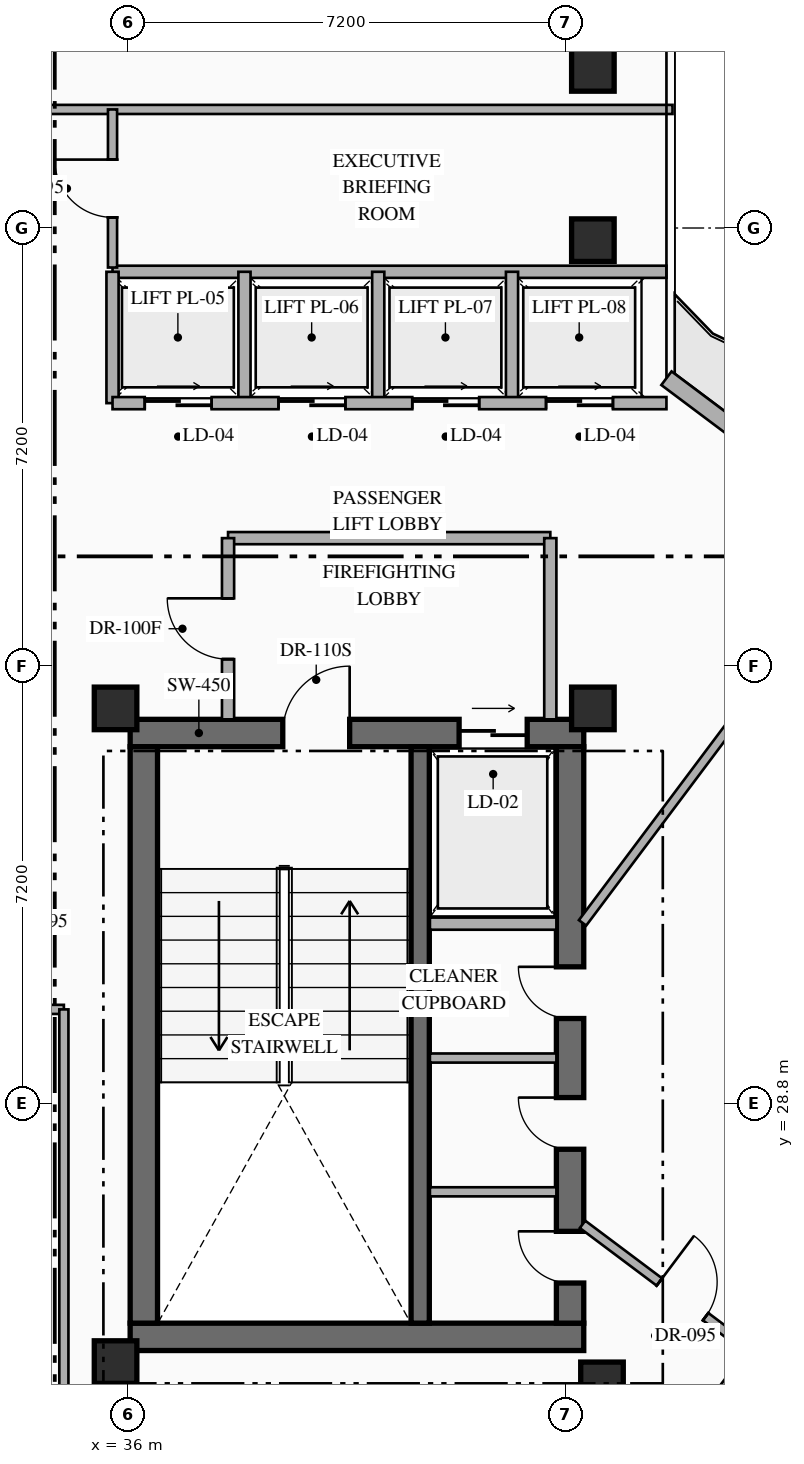
"""IFC4 building model, lengths in metres.
Left out: names, types, materials, properties, quantities, classifications, styles, units other than length and angle.
Written with IfcOpenShell. Run it as: python <this file> out.ifc"""

import sys

from ifc_helpers import new_model, si_unit, direction, frame, frame_2d, origin, origin_2d, place, context, subcontext, project, spatial, rectangle, hollow_rectangle, extrude, element, fill, save


model = new_model("IFC4")
c1 = context("Model", 3, precision=1e-05, world=origin(), true_north=direction((0.0, 1.0)))
c2 = subcontext(c1, "Body", "Model", "MODEL_VIEW")
j1 = project(units=[si_unit("LENGTHUNIT", "METRE"), si_unit("PLANEANGLEUNIT", "RADIAN")], contexts=[c1])
p1 = place(None, origin())
s1 = spatial("IfcSite", under=j1, at=p1, CompositionType="ELEMENT")
p2 = place(p1, origin())
s2 = spatial("IfcBuilding", under=s1, at=p2, CompositionType="ELEMENT")
p3 = place(p2, frame((0.0, 0.0, 227.55)))
s3 = spatial("IfcBuildingStorey", under=s2, at=p3, CompositionType="ELEMENT", Elevation=227.55)
p4 = place(p3, frame((36.04, 24.965, 0.0), z_axis=(0.0, 0.0, 1.0), x_axis=(1.0, 0.0, 0.0)))
e1 = element("IfcWall", 1, at=p4, inside=s3, PredefinedType="SHEAR", context=c2, shape_type="SweptSolid", body=[
    extrude(rectangle(XDim=7.46, YDim=0.45, at=frame_2d((3.73, 0.0))), origin(), (0.0, 0.0, 1.0), 3.6),
])
p5 = place(p3, frame((36.04, 34.895, 0.0), z_axis=(0.0, 0.0, 1.0), x_axis=(1.0, 0.0, 0.0)))
e2 = element("IfcWall", 2, at=p5, inside=s3, PredefinedType="SHEAR", context=c2, shape_type="SweptSolid", body=[
    extrude(rectangle(XDim=7.46, YDim=0.45, at=frame_2d((3.73, 0.0))), origin(), (0.0, 0.0, 1.0), 3.6),
])
p6 = place(p5, frame((2.51, 0.0, 0.0)))
e3 = element("IfcOpeningElement", 3, at=p6, cuts=e2, PredefinedType="OPENING", context=c2, shape_type="SweptSolid", body=[
    extrude(rectangle(XDim=1.1, YDim=2.2, at=frame_2d((0.55, 1.1))), frame((0.0, 0.235, 0.0), z_axis=(0.0, -1.0, 0.0), x_axis=(1.0, 0.0, 0.0)), (0.0, 0.0, 1.0), 0.47),
])
p7 = place(p5, frame((5.41, 0.0, 0.0)))
e4 = element("IfcOpeningElement", 4, at=p7, cuts=e2, PredefinedType="OPENING", context=c2, shape_type="SweptSolid", body=[
    extrude(rectangle(XDim=1.12, YDim=2.15, at=frame_2d((0.56, 1.075))), frame((0.0, 0.235, 0.0), z_axis=(0.0, -1.0, 0.0), x_axis=(1.0, 0.0, 0.0)), (0.0, 0.0, 1.0), 0.47),
])
p8 = place(p3, frame((36.265, 25.19, 0.0), z_axis=(0.0, 0.0, 1.0), x_axis=(0.0, 1.0, 0.0)))
e5 = element("IfcWall", 5, at=p8, inside=s3, PredefinedType="SHEAR", context=c2, shape_type="SweptSolid", body=[
    extrude(rectangle(XDim=9.48, YDim=0.45, at=frame_2d((4.74, 0.0))), origin(), (0.0, 0.0, 1.0), 3.6),
])
p9 = place(p3, frame((43.275, 25.19, 0.0), z_axis=(0.0, 0.0, 1.0), x_axis=(0.0, 1.0, 0.0)))
e6 = element("IfcWall", 6, at=p9, inside=s3, PredefinedType="SHEAR", context=c2, shape_type="SweptSolid", body=[
    extrude(rectangle(XDim=9.48, YDim=0.45, at=frame_2d((4.74, 0.0))), origin(), (0.0, 0.0, 1.0), 3.6),
])
p10 = place(p9, frame((0.66, 0.0, 0.0)))
e7 = element("IfcOpeningElement", 7, at=p10, cuts=e6, PredefinedType="OPENING", context=c2, shape_type="SweptSolid", body=[
    extrude(rectangle(XDim=0.85, YDim=2.08, at=frame_2d((0.425, 1.04))), frame((0.0, 0.235, 0.0), z_axis=(0.0, -1.0, 0.0), x_axis=(1.0, 0.0, 0.0)), (0.0, 0.0, 1.0), 0.47),
])
p11 = place(p9, frame((2.86, 0.0, 0.0)))
e8 = element("IfcOpeningElement", 8, at=p11, cuts=e6, PredefinedType="OPENING", context=c2, shape_type="SweptSolid", body=[
    extrude(rectangle(XDim=0.85, YDim=2.08, at=frame_2d((0.425, 1.04))), frame((0.0, 0.235, 0.0), z_axis=(0.0, -1.0, 0.0), x_axis=(1.0, 0.0, 0.0)), (0.0, 0.0, 1.0), 0.47),
])
p12 = place(p9, frame((5.01, 0.0, 0.0)))
e9 = element("IfcOpeningElement", 9, at=p12, cuts=e6, PredefinedType="OPENING", context=c2, shape_type="SweptSolid", body=[
    extrude(rectangle(XDim=0.85, YDim=2.08, at=frame_2d((0.425, 1.04))), frame((0.0, 0.235, 0.0), z_axis=(0.0, -1.0, 0.0), x_axis=(1.0, 0.0, 0.0)), (0.0, 0.0, 1.0), 0.47),
])
p13 = place(p3, frame((40.81, 25.19, 0.0), z_axis=(0.0, 0.0, 1.0), x_axis=(0.0, 1.0, 0.0)))
e10 = element("IfcWall", 10, at=p13, inside=s3, PredefinedType="SHEAR", context=c2, shape_type="SweptSolid", body=[
    extrude(rectangle(XDim=9.48, YDim=0.3, at=frame_2d((4.74, 0.0))), origin(), (0.0, 0.0, 1.0), 3.6),
])
for number, where, z_axis, x_axis in (
    (11, (35.8, 24.55, 0.0), (0.0, 0.0, 1.0), (1.0, 0.0, 0.0)),
    (12, (43.8, 24.2, 0.0), (0.0, 0.0, 1.0), (1.0, 0.0, 0.0)),
    (13, (35.8, 35.3, 0.0), (0.0, 0.0, 1.0), (1.0, 0.0, 0.0)),
    (14, (43.65, 35.3, 0.0), (0.0, 0.0, 1.0), (1.0, 0.0, 0.0)),
    (15, (43.65, 43.0, 0.0), (0.0, 0.0, 1.0), (1.0, 0.0, 0.0)),
    (16, (43.65, 45.8, 0.0), (0.0, 0.0, 1.0), (1.0, 0.0, 0.0)),
):
    element("IfcColumn", number, at=place(p3, frame(where, z_axis=z_axis, x_axis=x_axis)), inside=s3, PredefinedType="COLUMN", context=c2, shape_type="SweptSolid", body=[
        extrude(hollow_rectangle(XDim=0.7, YDim=0.7, WallThickness=0.028, at=origin_2d()), origin(), (0.0, 0.0, 1.0), 3.6),
    ])
p14 = place(p3, frame((44.86, 40.73, 0.0), z_axis=(0.0, 0.0, 1.0), x_axis=(0.800007624502, -0.599989833863, 0.0)))
e17 = element("IfcWall", 17, at=p14, inside=s3, PredefinedType="STANDARD", context=c2, shape_type="SweptSolid", body=[
    extrude(rectangle(XDim=19.212, YDim=0.28, at=frame_2d((9.606, 0.0))), origin(), (0.0, 0.0, 1.0), 3.35),
])
p15 = place(p14, frame((1.755, 0.0, 0.0)))
e18 = element("IfcOpeningElement", 18, at=p15, cuts=e17, PredefinedType="OPENING", context=c2, shape_type="SweptSolid", body=[
    extrude(rectangle(XDim=1.1, YDim=2.2, at=frame_2d((0.55, 1.1))), frame((0.0, 0.15, 0.0), z_axis=(0.0, -1.0, 0.0), x_axis=(1.0, 0.0, 0.0)), (0.0, 0.0, 1.0), 0.3),
])
p16 = place(p14, frame((13.509, 0.0, 0.85)))
e19 = element("IfcOpeningElement", 19, at=p16, cuts=e17, PredefinedType="OPENING", context=c2, shape_type="SweptSolid", body=[
    extrude(rectangle(XDim=1.8, YDim=2.1, at=frame_2d((0.9, 1.05))), frame((0.0, 0.15, 0.0), z_axis=(0.0, -1.0, 0.0), x_axis=(1.0, 0.0, 0.0)), (0.0, 0.0, 1.0), 0.3),
])
p17 = place(p3, frame((40.97, 31.76, 0.0), z_axis=(0.0, 0.0, 1.0), x_axis=(1.0, 0.0, 0.0)))
e20 = element("IfcWall", 20, at=p17, inside=s3, PredefinedType="STANDARD", context=c2, shape_type="SweptSolid", body=[
    extrude(rectangle(XDim=2.08, YDim=0.2, at=frame_2d((1.04, 0.0))), origin(), (0.0, 0.0, 1.0), 3.35),
])
for number, where, z_axis, x_axis in (
    (21, (40.97, 27.35, 0.0), (0.0, 0.0, 1.0), (1.0, 0.0, 0.0)),
    (22, (40.97, 29.55, 0.0), (0.0, 0.0, 1.0), (1.0, 0.0, 0.0)),
):
    element("IfcWall", number, at=place(p3, frame(where, z_axis=z_axis, x_axis=x_axis)), inside=s3, PredefinedType="PARTITIONING", context=c2, shape_type="SweptSolid", body=[
        extrude(rectangle(XDim=2.08, YDim=0.15, at=frame_2d((1.04, 0.0))), origin(), (0.0, 0.0, 1.0), 3.35),
    ])
p18 = place(p3, frame((37.65, 38.1, 0.0), z_axis=(0.0, 0.0, 1.0), x_axis=(1.0, 0.0, 0.0)))
e23 = element("IfcWall", 23, at=p18, inside=s3, PredefinedType="STANDARD", context=c2, shape_type="SweptSolid", body=[
    extrude(rectangle(XDim=5.3, YDim=0.2, at=frame_2d((2.65, 0.0))), origin(), (0.0, 0.0, 1.0), 3.35),
])
p19 = place(p3, frame((42.95, 35.12, 0.0), z_axis=(0.0, 0.0, 1.0), x_axis=(0.0, 1.0, 0.0)))
e24 = element("IfcWall", 24, at=p19, inside=s3, PredefinedType="STANDARD", context=c2, shape_type="SweptSolid", body=[
    extrude(rectangle(XDim=2.98, YDim=0.2, at=frame_2d((1.49, 0.0))), origin(), (0.0, 0.0, 1.0), 3.35),
])
p20 = place(p3, frame((37.65, 35.12, 0.0), z_axis=(0.0, 0.0, 1.0), x_axis=(0.0, 1.0, 0.0)))
e25 = element("IfcWall", 25, at=p20, inside=s3, PredefinedType="STANDARD", context=c2, shape_type="SweptSolid", body=[
    extrude(rectangle(XDim=2.98, YDim=0.2, at=frame_2d((1.49, 0.0))), origin(), (0.0, 0.0, 1.0), 3.35),
])
p21 = place(p20, frame((0.99, 0.0, 0.0)))
e26 = element("IfcOpeningElement", 26, at=p21, cuts=e25, PredefinedType="OPENING", context=c2, shape_type="SweptSolid", body=[
    extrude(rectangle(XDim=1.0, YDim=2.2, at=frame_2d((0.5, 1.1))), frame((0.0, 0.11, 0.0), z_axis=(0.0, -1.0, 0.0), x_axis=(1.0, 0.0, 0.0)), (0.0, 0.0, 1.0), 0.22),
])
p22 = place(p3, frame((35.75, 42.48, 0.0), z_axis=(0.0, 0.0, 1.0), x_axis=(1.0, 0.0, 0.0)))
e27 = element("IfcWall", 27, at=p22, inside=s3, PredefinedType="STANDARD", context=c2, shape_type="SweptSolid", body=[
    extrude(rectangle(XDim=9.11, YDim=0.2, at=frame_2d((4.555, 0.0))), origin(), (0.0, 0.0, 1.0), 3.35),
])
for number, where, z_axis, x_axis in (
    (28, (35.75, 40.32, 0.0), (0.0, 0.0, 1.0), (0.0, 1.0, 0.0)),
    (29, (37.92, 40.32, 0.0), (0.0, 0.0, 1.0), (0.0, 1.0, 0.0)),
    (30, (40.12, 40.32, 0.0), (0.0, 0.0, 1.0), (0.0, 1.0, 0.0)),
    (31, (42.32, 40.32, 0.0), (0.0, 0.0, 1.0), (0.0, 1.0, 0.0)),
):
    element("IfcWall", number, at=place(p3, frame(where, z_axis=z_axis, x_axis=x_axis)), inside=s3, PredefinedType="STANDARD", context=c2, shape_type="SweptSolid", body=[
        extrude(rectangle(XDim=2.16, YDim=0.2, at=frame_2d((1.08, 0.0))), origin(), (0.0, 0.0, 1.0), 3.35),
    ])
p23 = place(p3, frame((35.75, 40.32, 0.0), z_axis=(0.0, 0.0, 1.0), x_axis=(1.0, 0.0, 0.0)))
e32 = element("IfcWall", 32, at=p23, inside=s3, PredefinedType="STANDARD", context=c2, shape_type="SweptSolid", body=[
    extrude(rectangle(XDim=9.11, YDim=0.2, at=frame_2d((4.555, 0.0))), origin(), (0.0, 0.0, 1.0), 3.35),
])
p24 = place(p23, frame((0.53, 0.0, 0.0)))
e33 = element("IfcOpeningElement", 33, at=p24, cuts=e32, PredefinedType="OPENING", context=c2, shape_type="SweptSolid", body=[
    extrude(rectangle(XDim=1.1, YDim=2.18, at=frame_2d((0.55, 1.09))), frame((0.0, 0.11, 0.0), z_axis=(0.0, -1.0, 0.0), x_axis=(1.0, 0.0, 0.0)), (0.0, 0.0, 1.0), 0.22),
])
p25 = place(p23, frame((2.73, 0.0, 0.0)))
e34 = element("IfcOpeningElement", 34, at=p25, cuts=e32, PredefinedType="OPENING", context=c2, shape_type="SweptSolid", body=[
    extrude(rectangle(XDim=1.1, YDim=2.18, at=frame_2d((0.55, 1.09))), frame((0.0, 0.11, 0.0), z_axis=(0.0, -1.0, 0.0), x_axis=(1.0, 0.0, 0.0)), (0.0, 0.0, 1.0), 0.22),
])
p26 = place(p23, frame((4.93, 0.0, 0.0)))
e35 = element("IfcOpeningElement", 35, at=p26, cuts=e32, PredefinedType="OPENING", context=c2, shape_type="SweptSolid", body=[
    extrude(rectangle(XDim=1.1, YDim=2.18, at=frame_2d((0.55, 1.09))), frame((0.0, 0.11, 0.0), z_axis=(0.0, -1.0, 0.0), x_axis=(1.0, 0.0, 0.0)), (0.0, 0.0, 1.0), 0.22),
])
p27 = place(p23, frame((7.13, 0.0, 0.0)))
e36 = element("IfcOpeningElement", 36, at=p27, cuts=e32, PredefinedType="OPENING", context=c2, shape_type="SweptSolid", body=[
    extrude(rectangle(XDim=1.1, YDim=2.18, at=frame_2d((0.55, 1.09))), frame((0.0, 0.11, 0.0), z_axis=(0.0, -1.0, 0.0), x_axis=(1.0, 0.0, 0.0)), (0.0, 0.0, 1.0), 0.22),
])
p28 = place(p3, frame((30.5, 30.35, 0.0), z_axis=(0.0, 0.0, 1.0), x_axis=(1.0, 0.0, 0.0)))
e37 = element("IfcWall", 37, at=p28, inside=s3, PredefinedType="PARTITIONING", context=c2, shape_type="SweptSolid", body=[
    extrude(rectangle(XDim=4.45, YDim=0.15, at=frame_2d((2.225, 0.0))), origin(), (0.0, 0.0, 1.0), 3.35),
])
p29 = place(p28, frame((2.846, 0.0, 0.0)))
e38 = element("IfcOpeningElement", 38, at=p29, cuts=e37, PredefinedType="OPENING", context=c2, shape_type="SweptSolid", body=[
    extrude(rectangle(XDim=0.95, YDim=2.15, at=frame_2d((0.475, 1.075))), frame((0.0, 0.085, 0.0), z_axis=(0.0, -1.0, 0.0), x_axis=(1.0, 0.0, 0.0)), (0.0, 0.0, 1.0), 0.17),
])
p30 = place(p3, frame((34.95, 23.2, 0.0), z_axis=(0.0, 0.0, 1.0), x_axis=(0.0, 1.0, 0.0)))
e39 = element("IfcWall", 39, at=p30, inside=s3, PredefinedType="PARTITIONING", context=c2, shape_type="SweptSolid", body=[
    extrude(rectangle(XDim=7.15, YDim=0.15, at=frame_2d((3.575, 0.0))), origin(), (0.0, 0.0, 1.0), 3.35),
])
p31 = place(p3, frame((20.9, 45.15, 0.0), z_axis=(0.0, 0.0, 1.0), x_axis=(1.0, 0.0, 0.0)))
e40 = element("IfcWall", 40, at=p31, inside=s3, PredefinedType="PARTITIONING", context=c2, shape_type="SweptSolid", body=[
    extrude(rectangle(XDim=24.06, YDim=0.15, at=frame_2d((12.03, 0.0))), origin(), (0.0, 0.0, 1.0), 3.35),
])
p32 = place(p31, frame((9.32, 0.0, 0.0)))
e41 = element("IfcOpeningElement", 41, at=p32, cuts=e40, PredefinedType="OPENING", context=c2, shape_type="SweptSolid", body=[
    extrude(rectangle(XDim=0.95, YDim=2.15, at=frame_2d((0.475, 1.075))), frame((0.0, 0.085, 0.0), z_axis=(0.0, -1.0, 0.0), x_axis=(1.0, 0.0, 0.0)), (0.0, 0.0, 1.0), 0.17),
])
p33 = place(p3, frame((42.72, 20.01, 0.0), z_axis=(0.0, 0.0, 1.0), x_axis=(0.600013020683, 0.799990234322, 0.0)))
e42 = element("IfcWall", 42, at=p33, inside=s3, PredefinedType="PARTITIONING", context=c2, shape_type="SweptSolid", body=[
    extrude(rectangle(XDim=9.0, YDim=0.15, at=frame_2d((4.5, 0.0))), origin(), (0.0, 0.0, 1.0), 3.35),
])
p34 = place(p33, frame((2.202, 0.0, 0.0)))
e43 = element("IfcOpeningElement", 43, at=p34, cuts=e42, PredefinedType="OPENING", context=c2, shape_type="SweptSolid", body=[
    extrude(rectangle(XDim=0.95, YDim=2.15, at=frame_2d((0.475, 1.075))), frame((0.0, 0.085, 0.0), z_axis=(0.0, -1.0, 0.0), x_axis=(1.0, 0.0, 0.0)), (0.0, 0.0, 1.0), 0.17),
])
p35 = place(p3, frame((43.48, 26.815, 0.0), z_axis=(0.0, 0.0, 1.0), x_axis=(0.800008430676, -0.599988758934, 0.0)))
e44 = element("IfcWall", 44, at=p35, inside=s3, PredefinedType="PARTITIONING", context=c2, shape_type="SweptSolid", body=[
    extrude(rectangle(XDim=3.475, YDim=0.15, at=frame_2d((1.738, 0.0))), origin(), (0.0, 0.0, 1.0), 3.35),
])
p36 = place(p35, frame((1.58, 0.0, 0.0)))
e45 = element("IfcOpeningElement", 45, at=p36, cuts=e44, PredefinedType="OPENING", context=c2, shape_type="SweptSolid", body=[
    extrude(rectangle(XDim=0.95, YDim=2.15, at=frame_2d((0.475, 1.075))), frame((0.0, 0.085, 0.0), z_axis=(0.0, -1.0, 0.0), x_axis=(1.0, 0.0, 0.0)), (0.0, 0.0, 1.0), 0.17),
])
p37 = place(p3, frame((43.48, 31.773, 0.0), z_axis=(0.0, 0.0, 1.0), x_axis=(0.599971041729, 0.800021717885, 0.0)))
e46 = element("IfcWall", 46, at=p37, inside=s3, PredefinedType="PARTITIONING", context=c2, shape_type="SweptSolid", body=[
    extrude(rectangle(XDim=8.094, YDim=0.15, at=frame_2d((4.047, 0.0))), origin(), (0.0, 0.0, 1.0), 3.35),
])
p38 = place(p3, frame((35.75, 42.55, 0.0), z_axis=(0.0, 0.0, 1.0), x_axis=(0.0, 1.0, 0.0)))
e47 = element("IfcWall", 47, at=p38, inside=s3, PredefinedType="PARTITIONING", context=c2, shape_type="SweptSolid", body=[
    extrude(rectangle(XDim=2.6, YDim=0.15, at=frame_2d((1.3, 0.0))), origin(), (0.0, 0.0, 1.0), 3.35),
])
p39 = place(p38, frame((0.825, 0.0, 0.0)))
e48 = element("IfcOpeningElement", 48, at=p39, cuts=e47, PredefinedType="OPENING", context=c2, shape_type="SweptSolid", body=[
    extrude(rectangle(XDim=0.95, YDim=2.15, at=frame_2d((0.475, 1.075))), frame((0.0, 0.085, 0.0), z_axis=(0.0, -1.0, 0.0), x_axis=(1.0, 0.0, 0.0)), (0.0, 0.0, 1.0), 0.17),
])
p40 = place(p6, origin())
e49 = element("IfcDoor", 49, at=p40, inside=s3, OperationType="SINGLE_SWING_RIGHT", PredefinedType="DOOR", context=c2, shape_type="SweptSolid", body=[
    extrude(rectangle(XDim=1.1, YDim=2.2, at=frame_2d((0.55, 1.1))), frame((0.0, 0.025, 0.0), z_axis=(0.0, -1.0, 0.0), x_axis=(1.0, 0.0, 0.0)), (0.0, 0.0, 1.0), 0.05),
])
fill(e3, e49)
p41 = place(p7, origin())
e50 = element("IfcDoor", 50, at=p41, inside=s3, OperationType="SLIDING_TO_RIGHT", PredefinedType="USERDEFINED", context=c2, shape_type="SweptSolid", body=[
    extrude(rectangle(XDim=1.12, YDim=2.15, at=frame_2d((0.56, 1.075))), frame((0.0, 0.025, 0.0), z_axis=(0.0, -1.0, 0.0), x_axis=(1.0, 0.0, 0.0)), (0.0, 0.0, 1.0), 0.05),
])
fill(e4, e50)
p42 = place(p10, origin())
e51 = element("IfcDoor", 51, at=p42, inside=s3, OperationType="SINGLE_SWING_RIGHT", PredefinedType="DOOR", context=c2, shape_type="SweptSolid", body=[
    extrude(rectangle(XDim=0.85, YDim=2.08, at=frame_2d((0.425, 1.04))), frame((0.0, 0.025, 0.0), z_axis=(0.0, -1.0, 0.0), x_axis=(1.0, 0.0, 0.0)), (0.0, 0.0, 1.0), 0.05),
])
fill(e7, e51)
p43 = place(p11, origin())
e52 = element("IfcDoor", 52, at=p43, inside=s3, OperationType="SINGLE_SWING_RIGHT", PredefinedType="DOOR", context=c2, shape_type="SweptSolid", body=[
    extrude(rectangle(XDim=0.85, YDim=2.08, at=frame_2d((0.425, 1.04))), frame((0.0, 0.025, 0.0), z_axis=(0.0, -1.0, 0.0), x_axis=(1.0, 0.0, 0.0)), (0.0, 0.0, 1.0), 0.05),
])
fill(e8, e52)
p44 = place(p12, origin())
e53 = element("IfcDoor", 53, at=p44, inside=s3, OperationType="SINGLE_SWING_RIGHT", PredefinedType="DOOR", context=c2, shape_type="SweptSolid", body=[
    extrude(rectangle(XDim=0.85, YDim=2.08, at=frame_2d((0.425, 1.04))), frame((0.0, 0.025, 0.0), z_axis=(0.0, -1.0, 0.0), x_axis=(1.0, 0.0, 0.0)), (0.0, 0.0, 1.0), 0.05),
])
fill(e9, e53)
p45 = place(p21, origin())
e54 = element("IfcDoor", 54, at=p45, inside=s3, OperationType="SINGLE_SWING_RIGHT", PredefinedType="DOOR", context=c2, shape_type="SweptSolid", body=[
    extrude(rectangle(XDim=1.0, YDim=2.2, at=frame_2d((0.5, 1.1))), frame((0.0, 0.025, 0.0), z_axis=(0.0, -1.0, 0.0), x_axis=(1.0, 0.0, 0.0)), (0.0, 0.0, 1.0), 0.05),
])
fill(e26, e54)
p46 = place(p24, origin())
e55 = element("IfcDoor", 55, at=p46, inside=s3, OperationType="SLIDING_TO_RIGHT", PredefinedType="USERDEFINED", context=c2, shape_type="SweptSolid", body=[
    extrude(rectangle(XDim=1.1, YDim=2.18, at=frame_2d((0.55, 1.09))), frame((0.0, 0.025, 0.0), z_axis=(0.0, -1.0, 0.0), x_axis=(1.0, 0.0, 0.0)), (0.0, 0.0, 1.0), 0.05),
])
fill(e33, e55)
p47 = place(p25, origin())
e56 = element("IfcDoor", 56, at=p47, inside=s3, OperationType="SLIDING_TO_RIGHT", PredefinedType="USERDEFINED", context=c2, shape_type="SweptSolid", body=[
    extrude(rectangle(XDim=1.1, YDim=2.18, at=frame_2d((0.55, 1.09))), frame((0.0, 0.025, 0.0), z_axis=(0.0, -1.0, 0.0), x_axis=(1.0, 0.0, 0.0)), (0.0, 0.0, 1.0), 0.05),
])
fill(e34, e56)
p48 = place(p26, origin())
e57 = element("IfcDoor", 57, at=p48, inside=s3, OperationType="SLIDING_TO_RIGHT", PredefinedType="USERDEFINED", context=c2, shape_type="SweptSolid", body=[
    extrude(rectangle(XDim=1.1, YDim=2.18, at=frame_2d((0.55, 1.09))), frame((0.0, 0.025, 0.0), z_axis=(0.0, -1.0, 0.0), x_axis=(1.0, 0.0, 0.0)), (0.0, 0.0, 1.0), 0.05),
])
fill(e35, e57)
p49 = place(p27, origin())
e58 = element("IfcDoor", 58, at=p49, inside=s3, OperationType="SLIDING_TO_RIGHT", PredefinedType="USERDEFINED", context=c2, shape_type="SweptSolid", body=[
    extrude(rectangle(XDim=1.1, YDim=2.18, at=frame_2d((0.55, 1.09))), frame((0.0, 0.025, 0.0), z_axis=(0.0, -1.0, 0.0), x_axis=(1.0, 0.0, 0.0)), (0.0, 0.0, 1.0), 0.05),
])
fill(e36, e58)
p50 = place(p36, origin())
e59 = element("IfcDoor", 59, at=p50, inside=s3, OperationType="SINGLE_SWING_LEFT", PredefinedType="DOOR", context=c2, shape_type="SweptSolid", body=[
    extrude(rectangle(XDim=0.95, YDim=2.15, at=frame_2d((0.475, 1.075))), frame((0.0, 0.025, 0.0), z_axis=(0.0, -1.0, 0.0), x_axis=(1.0, 0.0, 0.0)), (0.0, 0.0, 1.0), 0.05),
])
fill(e45, e59)
p51 = place(p39, origin())
e60 = element("IfcDoor", 60, at=p51, inside=s3, OperationType="SINGLE_SWING_RIGHT", PredefinedType="DOOR", context=c2, shape_type="SweptSolid", body=[
    extrude(rectangle(XDim=0.95, YDim=2.15, at=frame_2d((0.475, 1.075))), frame((0.0, 0.025, 0.0), z_axis=(0.0, -1.0, 0.0), x_axis=(1.0, 0.0, 0.0)), (0.0, 0.0, 1.0), 0.05),
])
fill(e48, e60)
save(model, sys.argv[1])
